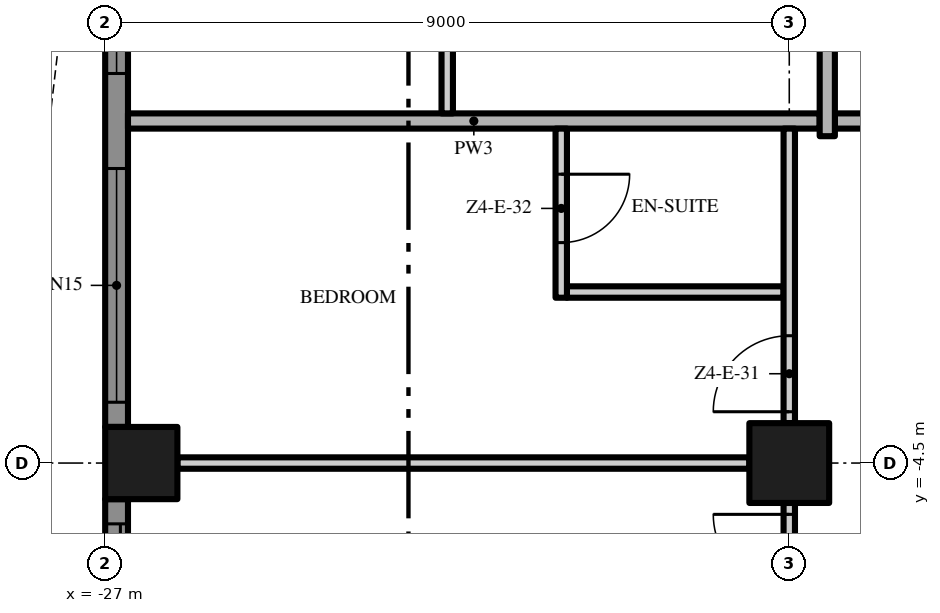
"""IFC4 building model, lengths in metres.
Left out: names, types, materials, properties, quantities, classifications, styles, units other than length and angle.
Written with IfcOpenShell. Run it as: python <this file> out.ifc"""

import sys

from ifc_helpers import new_model, si_unit, direction, frame, frame_2d, origin, origin_2d, place, context, subcontext, project, spatial, polyline, rectangle, outline, extrude, element, fill, save


model = new_model("IFC4")
c1 = context("Model", 3, precision=1e-05, world=origin(), true_north=direction((0.0, 1.0)))
c2 = subcontext(c1, "Body", "Model", "MODEL_VIEW")
j1 = project(units=[si_unit("LENGTHUNIT", "METRE"), si_unit("PLANEANGLEUNIT", "RADIAN")], contexts=[c1])
p1 = place(None, origin())
s1 = spatial("IfcSite", under=j1, at=p1, CompositionType="ELEMENT")
p2 = place(p1, origin())
s2 = spatial("IfcBuilding", under=s1, at=p2, CompositionType="ELEMENT")
p3 = place(p2, frame((0.0, 0.0, 230.0)))
s3 = spatial("IfcBuildingStorey", under=s2, at=p3, CompositionType="ELEMENT", Elevation=230.0)
p4 = place(p3, frame((-18.0, -4.5, 0.0), z_axis=(0.0, 0.0, 1.0), x_axis=(1.0, 0.0, 0.0)))
e1 = element("IfcColumn", 1, at=p4, inside=s3, PredefinedType="COLUMN", context=c2, shape_type="SweptSolid", body=[
    extrude(rectangle(XDim=1.05, YDim=1.05, at=origin_2d()), origin(), (0.0, 0.0, 1.0), 3.5),
])
p5 = place(p3, frame((-26.525, -4.5, 0.0), z_axis=(0.0, 0.0, 1.0), x_axis=(1.0, 0.0, 0.0)))
e2 = element("IfcColumn", 2, at=p5, inside=s3, PredefinedType="COLUMN", context=c2, shape_type="SweptSolid", body=[
    extrude(rectangle(XDim=0.95, YDim=0.95, at=origin_2d()), origin(), (0.0, 0.0, 1.0), 3.5),
])
p6 = place(p3, frame((-26.85, -4.025, 0.0), z_axis=(0.0, 0.0, 1.0), x_axis=(0.0, 1.0, 0.0)))
e3 = element("IfcWall", 3, at=p6, inside=s3, PredefinedType="SOLIDWALL", context=c2, shape_type="SweptSolid", body=[
    extrude(rectangle(XDim=8.05, YDim=0.3, at=frame_2d((4.025, 0.0))), origin(), (0.0, 0.0, 1.0), 3.5),
])
p7 = place(p6, frame((4.65, 0.0, 0.45)))
e4 = element("IfcOpeningElement", 4, at=p7, cuts=e3, PredefinedType="OPENING", context=c2, shape_type="SweptSolid", body=[
    extrude(rectangle(XDim=3.075, YDim=2.65, at=frame_2d((1.538, 1.325))), frame((0.0, 0.16, 0.0), z_axis=(0.0, -1.0, 0.0), x_axis=(1.0, 0.0, 0.0)), (0.0, 0.0, 1.0), 0.32),
])
p8 = place(p6, frame((0.325, 0.0, 0.45)))
e5 = element("IfcOpeningElement", 5, at=p8, cuts=e3, PredefinedType="OPENING", context=c2, shape_type="SweptSolid", body=[
    extrude(rectangle(XDim=3.075, YDim=2.65, at=frame_2d((1.538, 1.325))), frame((0.0, 0.16, 0.0), z_axis=(0.0, -1.0, 0.0), x_axis=(1.0, 0.0, 0.0)), (0.0, 0.0, 1.0), 0.32),
])
p9 = place(p3, frame((-26.85, -13.025, 0.0), z_axis=(0.0, 0.0, 1.0), x_axis=(0.0, 1.0, 0.0)))
e6 = element("IfcWall", 6, at=p9, inside=s3, PredefinedType="SOLIDWALL", context=c2, shape_type="SweptSolid", body=[
    extrude(rectangle(XDim=8.05, YDim=0.3, at=frame_2d((4.025, 0.0))), origin(), (0.0, 0.0, 1.0), 3.5),
])
p10 = place(p9, frame((4.65, 0.0, 0.0)))
e7 = element("IfcOpeningElement", 7, at=p10, cuts=e6, PredefinedType="OPENING", context=c2, shape_type="SweptSolid", body=[
    extrude(rectangle(XDim=3.075, YDim=2.4, at=frame_2d((1.538, 1.2))), frame((0.0, 0.16, 0.0), z_axis=(0.0, -1.0, 0.0), x_axis=(1.0, 0.0, 0.0)), (0.0, 0.0, 1.0), 0.32),
])
p11 = place(p9, frame((0.325, 0.0, 0.45)))
e8 = element("IfcOpeningElement", 8, at=p11, cuts=e6, PredefinedType="OPENING", context=c2, shape_type="SweptSolid", body=[
    extrude(rectangle(XDim=3.075, YDim=2.65, at=frame_2d((1.538, 1.325))), frame((0.0, 0.16, 0.0), z_axis=(0.0, -1.0, 0.0), x_axis=(1.0, 0.0, 0.0)), (0.0, 0.0, 1.0), 0.32),
])
p12 = place(p3, origin())
e9 = element("IfcWall", 9, at=p12, inside=s3, PredefinedType="USERDEFINED", context=c2, shape_type="SweptSolid", body=[
    extrude(outline(polyline([(-27.951, 18.0), (-27.615, 16.5), (-27.6, 16.125), (-27.731, 15.0), (-28.255, 13.5), (-28.988, 12.0), (-29.649, 10.5), (-29.985, 9.0), (-30.0, 8.625), (-29.869, 7.5), (-29.345, 6.0), (-28.612, 4.5), (-27.951, 3.0), (-27.615, 1.5), (-27.6, 1.125), (-27.731, 0.0), (-28.255, -1.5), (-28.988, -3.0), (-29.649, -4.5), (-29.985, -6.0), (-30.0, -6.375), (-29.869, -7.5), (-29.345, -9.0), (-28.612, -10.5), (-27.951, -12.0), (-27.615, -13.5), (-27.6, -13.875), (-27.731, -15.0), (-28.255, -16.5), (-28.988, -18.0), (-28.763, -18.11), (-28.024, -16.596), (-27.486, -15.056), (-27.349, -13.885), (-27.366, -13.467), (-27.713, -11.921), (-28.385, -10.395), (-29.114, -8.904), (-29.624, -7.444), (-29.749, -6.365), (-29.736, -6.033), (-29.41, -4.579), (-28.761, -3.105), (-28.024, -1.596), (-27.486, -0.056), (-27.349, 1.115), (-27.366, 1.533), (-27.713, 3.079), (-28.385, 4.605), (-29.114, 6.096), (-29.624, 7.556), (-29.749, 8.635), (-29.736, 8.967), (-29.41, 10.421), (-28.761, 11.895), (-28.024, 13.404), (-27.486, 14.944), (-27.349, 16.115), (-27.366, 16.533), (-27.708, 18.055), (-27.951, 18.0)])), origin(), (0.0, 0.0, 1.0), 0.9),
])
p13 = place(p3, frame((-26.05, -4.5, 0.0), z_axis=(0.0, 0.0, 1.0), x_axis=(1.0, 0.0, 0.0)))
e10 = element("IfcWall", 10, at=p13, inside=s3, PredefinedType="PARTITIONING", context=c2, shape_type="SweptSolid", body=[
    extrude(rectangle(XDim=7.525, YDim=0.15, at=frame_2d((3.763, 0.0))), origin(), (0.0, 0.0, 1.0), 3.5),
])
p14 = place(p3, frame((-20.925, -2.25, 0.0), z_axis=(0.0, 0.0, 1.0), x_axis=(1.0, 0.0, 0.0)))
e11 = element("IfcWall", 11, at=p14, inside=s3, PredefinedType="PARTITIONING", context=c2, shape_type="SweptSolid", body=[
    extrude(rectangle(XDim=2.85, YDim=0.15, at=frame_2d((1.425, 0.0))), origin(), (0.0, 0.0, 1.0), 3.5),
])
p15 = place(p3, frame((-17.4, 0.0, 0.0), z_axis=(0.0, 0.0, 1.0), x_axis=(1.0, 0.0, 0.0)))
e12 = element("IfcWall", 12, at=p15, inside=s3, PredefinedType="PARTITIONING", context=c2, shape_type="SweptSolid", body=[
    extrude(rectangle(XDim=12.8, YDim=0.2, at=frame_2d((6.4, 0.0))), origin(), (0.0, 0.0, 1.0), 3.5),
])
p16 = place(p3, frame((-26.7, 0.0, 0.0), z_axis=(0.0, 0.0, 1.0), x_axis=(1.0, 0.0, 0.0)))
e13 = element("IfcWall", 13, at=p16, inside=s3, PredefinedType="PARTITIONING", context=c2, shape_type="SweptSolid", body=[
    extrude(rectangle(XDim=9.1, YDim=0.2, at=frame_2d((4.55, 0.0))), origin(), (0.0, 0.0, 1.0), 3.5),
])
p17 = place(p3, frame((-22.5, 0.1, 0.0), z_axis=(0.0, 0.0, 1.0), x_axis=(0.0, 1.0, 0.0)))
e14 = element("IfcWall", 14, at=p17, inside=s3, PredefinedType="PARTITIONING", context=c2, shape_type="SweptSolid", body=[
    extrude(rectangle(XDim=17.425, YDim=0.15, at=frame_2d((8.713, 0.0))), origin(), (0.0, 0.0, 1.0), 3.5),
])
p18 = place(p17, frame((1.65, 0.0, 0.0)))
e15 = element("IfcOpeningElement", 15, at=p18, cuts=e14, PredefinedType="OPENING", context=c2, shape_type="SweptSolid", body=[
    extrude(rectangle(XDim=1.0, YDim=2.4, at=frame_2d((0.5, 1.2))), frame((0.0, 0.085, 0.0), z_axis=(0.0, -1.0, 0.0), x_axis=(1.0, 0.0, 0.0)), (0.0, 0.0, 1.0), 0.17),
])
p19 = place(p17, frame((7.25, 0.0, 0.0)))
e16 = element("IfcOpeningElement", 16, at=p19, cuts=e14, PredefinedType="OPENING", context=c2, shape_type="SweptSolid", body=[
    extrude(rectangle(XDim=1.0, YDim=2.4, at=frame_2d((0.5, 1.2))), frame((0.0, 0.085, 0.0), z_axis=(0.0, -1.0, 0.0), x_axis=(1.0, 0.0, 0.0)), (0.0, 0.0, 1.0), 0.17),
])
p20 = place(p17, frame((9.5, 0.0, 0.0)))
e17 = element("IfcOpeningElement", 17, at=p20, cuts=e14, PredefinedType="OPENING", context=c2, shape_type="SweptSolid", body=[
    extrude(rectangle(XDim=1.0, YDim=2.4, at=frame_2d((0.5, 1.2))), frame((0.0, 0.085, 0.0), z_axis=(0.0, -1.0, 0.0), x_axis=(1.0, 0.0, 0.0)), (0.0, 0.0, 1.0), 0.17),
])
p21 = place(p17, frame((16.275, 0.0, 0.0)))
e18 = element("IfcOpeningElement", 18, at=p21, cuts=e14, PredefinedType="OPENING", context=c2, shape_type="SweptSolid", body=[
    extrude(rectangle(XDim=1.0, YDim=2.4, at=frame_2d((0.5, 1.2))), frame((0.0, 0.085, 0.0), z_axis=(0.0, -1.0, 0.0), x_axis=(1.0, 0.0, 0.0)), (0.0, 0.0, 1.0), 0.17),
])
p22 = place(p3, frame((-21.0, -0.1, 0.0), z_axis=(0.0, 0.0, 1.0), x_axis=(0.0, -1.0, 0.0)))
e19 = element("IfcWall", 19, at=p22, inside=s3, PredefinedType="PARTITIONING", context=c2, shape_type="SweptSolid", body=[
    extrude(rectangle(XDim=2.225, YDim=0.15, at=frame_2d((1.113, 0.0))), origin(), (0.0, 0.0, 1.0), 3.5),
])
p23 = place(p22, frame((0.6, 0.0, 0.0)))
e20 = element("IfcOpeningElement", 20, at=p23, cuts=e19, PredefinedType="OPENING", context=c2, shape_type="SweptSolid", body=[
    extrude(rectangle(XDim=0.9, YDim=2.1, at=frame_2d((0.45, 1.05))), frame((0.0, 0.085, 0.0), z_axis=(0.0, -1.0, 0.0), x_axis=(1.0, 0.0, 0.0)), (0.0, 0.0, 1.0), 0.17),
])
p24 = place(p3, frame((-18.0, -12.975, 0.0), z_axis=(0.0, 0.0, 1.0), x_axis=(0.0, 1.0, 0.0)))
e21 = element("IfcWall", 21, at=p24, inside=s3, PredefinedType="PARTITIONING", context=c2, shape_type="SweptSolid", body=[
    extrude(rectangle(XDim=7.95, YDim=0.15, at=frame_2d((3.975, 0.0))), origin(), (0.0, 0.0, 1.0), 3.5),
])
p25 = place(p24, frame((1.925, 0.0, 0.0)))
e22 = element("IfcOpeningElement", 22, at=p25, cuts=e21, PredefinedType="OPENING", context=c2, shape_type="SweptSolid", body=[
    extrude(rectangle(XDim=1.8, YDim=2.4, at=frame_2d((0.9, 1.2))), frame((0.0, 0.085, 0.0), z_axis=(0.0, -1.0, 0.0), x_axis=(1.0, 0.0, 0.0)), (0.0, 0.0, 1.0), 0.17),
])
p26 = place(p24, frame((6.8, 0.0, 0.0)))
e23 = element("IfcOpeningElement", 23, at=p26, cuts=e21, PredefinedType="OPENING", context=c2, shape_type="SweptSolid", body=[
    extrude(rectangle(XDim=1.0, YDim=2.4, at=frame_2d((0.5, 1.2))), frame((0.0, 0.085, 0.0), z_axis=(0.0, -1.0, 0.0), x_axis=(1.0, 0.0, 0.0)), (0.0, 0.0, 1.0), 0.17),
])
p27 = place(p3, frame((-18.0, -3.975, 0.0), z_axis=(0.0, 0.0, 1.0), x_axis=(0.0, 1.0, 0.0)))
e24 = element("IfcWall", 24, at=p27, inside=s3, PredefinedType="PARTITIONING", context=c2, shape_type="SweptSolid", body=[
    extrude(rectangle(XDim=3.875, YDim=0.15, at=frame_2d((1.938, 0.0))), origin(), (0.0, 0.0, 1.0), 3.5),
])
p28 = place(p27, frame((0.15, 0.0, 0.0)))
e25 = element("IfcOpeningElement", 25, at=p28, cuts=e24, PredefinedType="OPENING", context=c2, shape_type="SweptSolid", body=[
    extrude(rectangle(XDim=1.0, YDim=2.4, at=frame_2d((0.5, 1.2))), frame((0.0, 0.085, 0.0), z_axis=(0.0, -1.0, 0.0), x_axis=(1.0, 0.0, 0.0)), (0.0, 0.0, 1.0), 0.17),
])
p29 = place(p3, frame((-17.5, -0.2, 0.0), z_axis=(0.0, 0.0, 1.0), x_axis=(0.0, 1.0, 0.0)))
e26 = element("IfcWall", 26, at=p29, inside=s3, PredefinedType="PARTITIONING", context=c2, shape_type="SweptSolid", body=[
    extrude(rectangle(XDim=4.175, YDim=0.2, at=frame_2d((2.087, 0.0))), origin(), (0.0, 0.0, 1.0), 3.5),
])
p30 = place(p7, origin())
e27 = element("IfcWindow", 27, at=p30, inside=s3, PartitioningType="SINGLE_PANEL", PredefinedType="WINDOW", context=c2, shape_type="SweptSolid", body=[
    extrude(rectangle(XDim=3.075, YDim=2.65, at=frame_2d((1.538, 1.325))), frame((0.0, 0.03, 0.0), z_axis=(0.0, -1.0, 0.0), x_axis=(1.0, 0.0, 0.0)), (0.0, 0.0, 1.0), 0.06),
])
fill(e4, e27)
p31 = place(p8, origin())
e28 = element("IfcWindow", 28, at=p31, inside=s3, PartitioningType="SINGLE_PANEL", PredefinedType="WINDOW", context=c2, shape_type="SweptSolid", body=[
    extrude(rectangle(XDim=3.075, YDim=2.65, at=frame_2d((1.538, 1.325))), frame((0.0, 0.03, 0.0), z_axis=(0.0, -1.0, 0.0), x_axis=(1.0, 0.0, 0.0)), (0.0, 0.0, 1.0), 0.06),
])
fill(e5, e28)
p32 = place(p10, origin())
e29 = element("IfcDoor", 29, at=p32, inside=s3, OperationType="SINGLE_SWING_LEFT", PredefinedType="DOOR", context=c2, shape_type="SweptSolid", body=[
    extrude(rectangle(XDim=3.075, YDim=2.4, at=frame_2d((1.538, 1.2))), frame((0.0, 0.025, 0.0), z_axis=(0.0, -1.0, 0.0), x_axis=(1.0, 0.0, 0.0)), (0.0, 0.0, 1.0), 0.05),
])
fill(e7, e29)
p33 = place(p26, origin())
e30 = element("IfcDoor", 30, at=p33, inside=s3, OperationType="SINGLE_SWING_RIGHT", PredefinedType="DOOR", context=c2, shape_type="SweptSolid", body=[
    extrude(rectangle(XDim=1.0, YDim=2.4, at=frame_2d((0.5, 1.2))), frame((0.0, 0.025, 0.0), z_axis=(0.0, -1.0, 0.0), x_axis=(1.0, 0.0, 0.0)), (0.0, 0.0, 1.0), 0.05),
])
fill(e23, e30)
p34 = place(p28, origin())
e31 = element("IfcDoor", 31, at=p34, inside=s3, OperationType="SINGLE_SWING_LEFT", PredefinedType="DOOR", context=c2, shape_type="SweptSolid", body=[
    extrude(rectangle(XDim=1.0, YDim=2.4, at=frame_2d((0.5, 1.2))), frame((0.0, 0.025, 0.0), z_axis=(0.0, -1.0, 0.0), x_axis=(1.0, 0.0, 0.0)), (0.0, 0.0, 1.0), 0.05),
])
fill(e25, e31)
p35 = place(p23, origin())
e32 = element("IfcDoor", 32, at=p35, inside=s3, OperationType="SINGLE_SWING_LEFT", PredefinedType="DOOR", context=c2, shape_type="SweptSolid", body=[
    extrude(rectangle(XDim=0.9, YDim=2.1, at=frame_2d((0.45, 1.05))), frame((0.0, 0.025, 0.0), z_axis=(0.0, -1.0, 0.0), x_axis=(1.0, 0.0, 0.0)), (0.0, 0.0, 1.0), 0.05),
])
fill(e20, e32)
save(model, sys.argv[1])
